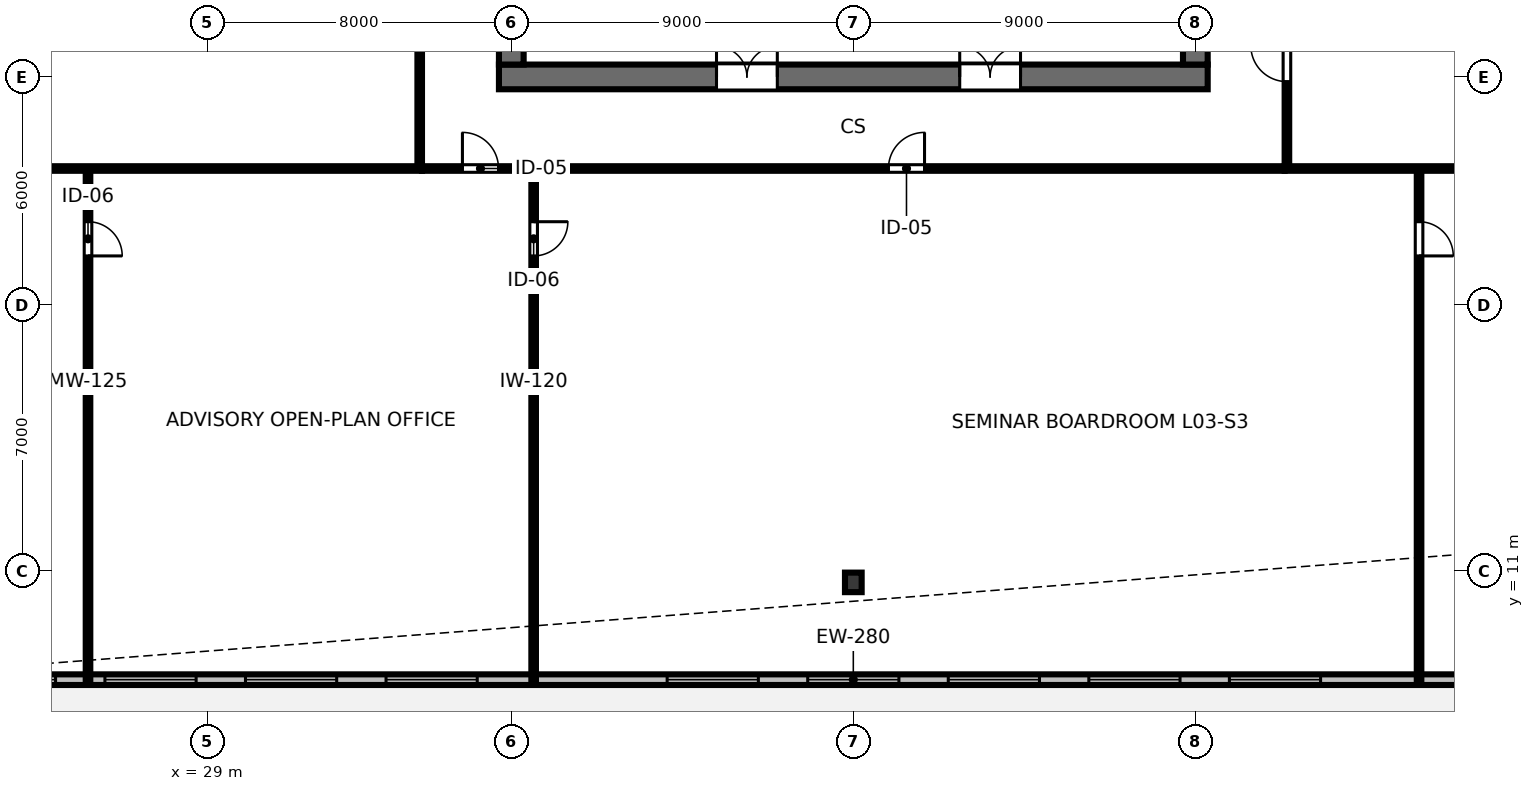
"""IFC4 building model, lengths in metres.
Left out: names, types, materials, properties, quantities, classifications, styles, units other than length and angle.
Written with IfcOpenShell. Run it as: python <this file> out.ifc"""

import sys

from ifc_helpers import new_model, si_unit, direction, frame, frame_2d, origin, origin_2d, place, context, subcontext, project, spatial, rectangle, i_section, extrude, element, fill, save


model = new_model("IFC4")
c1 = context("Model", 3, precision=1e-05, world=origin(), true_north=direction((0.0, 1.0)))
c2 = subcontext(c1, "Body", "Model", "MODEL_VIEW")
j1 = project(units=[si_unit("LENGTHUNIT", "METRE"), si_unit("PLANEANGLEUNIT", "RADIAN")], contexts=[c1])
p1 = place(None, origin())
s1 = spatial("IfcSite", under=j1, at=p1, CompositionType="ELEMENT")
p2 = place(p1, origin())
s2 = spatial("IfcBuilding", under=s1, at=p2, CompositionType="ELEMENT")
p3 = place(p2, frame((0.0, 0.0, 14.0)))
s3 = spatial("IfcBuildingStorey", under=s2, at=p3, CompositionType="ELEMENT", Elevation=14.0)
p4 = place(p3, frame((36.675, 24.0, 0.0), z_axis=(0.0, 0.0, 1.0), x_axis=(1.0, 0.0, 0.0)))
e1 = element("IfcWall", 1, at=p4, inside=s3, PredefinedType="SHEAR", context=c2, shape_type="SweptSolid", body=[
    extrude(rectangle(XDim=18.65, YDim=0.65, at=frame_2d((9.325, 0.0))), origin(), (0.0, 0.0, 1.0), 4.22),
])
p5 = place(p4, frame((5.725, 0.0, 0.0)))
e2 = element("IfcOpeningElement", 2, at=p5, cuts=e1, PredefinedType="OPENING", context=c2, shape_type="SweptSolid", body=[
    extrude(rectangle(XDim=1.6, YDim=2.15, at=frame_2d((0.8, 1.075))), frame((0.0, 0.335, 0.0), z_axis=(0.0, -1.0, 0.0), x_axis=(1.0, 0.0, 0.0)), (0.0, 0.0, 1.0), 0.67),
])
p6 = place(p4, frame((12.125, 0.0, 0.0)))
e3 = element("IfcOpeningElement", 3, at=p6, cuts=e1, PredefinedType="OPENING", context=c2, shape_type="SweptSolid", body=[
    extrude(rectangle(XDim=1.6, YDim=2.15, at=frame_2d((0.8, 1.075))), frame((0.0, 0.335, 0.0), z_axis=(0.0, -1.0, 0.0), x_axis=(1.0, 0.0, 0.0)), (0.0, 0.0, 1.0), 0.67),
])
p7 = place(p3, frame((37.0, 24.325, 0.0), z_axis=(0.0, 0.0, 1.0), x_axis=(0.0, 1.0, 0.0)))
e4 = element("IfcWall", 4, at=p7, inside=s3, PredefinedType="SHEAR", context=c2, shape_type="SweptSolid", body=[
    extrude(rectangle(XDim=15.35, YDim=0.65, at=frame_2d((7.675, 0.0))), origin(), (0.0, 0.0, 1.0), 4.22),
])
p8 = place(p7, frame((5.2, 0.0, 0.0)))
e5 = element("IfcOpeningElement", 5, at=p8, cuts=e4, PredefinedType="OPENING", context=c2, shape_type="SweptSolid", body=[
    extrude(rectangle(XDim=1.15, YDim=2.15, at=frame_2d((0.575, 1.075))), frame((0.0, 0.335, 0.0), z_axis=(0.0, -1.0, 0.0), x_axis=(1.0, 0.0, 0.0)), (0.0, 0.0, 1.0), 0.67),
])
p9 = place(p3, frame((55.0, 24.325, 0.0), z_axis=(0.0, 0.0, 1.0), x_axis=(0.0, 1.0, 0.0)))
e6 = element("IfcWall", 6, at=p9, inside=s3, PredefinedType="SHEAR", context=c2, shape_type="SweptSolid", body=[
    extrude(rectangle(XDim=15.35, YDim=0.65, at=frame_2d((7.675, 0.0))), origin(), (0.0, 0.0, 1.0), 4.22),
])
p10 = place(p9, frame((5.2, 0.0, 0.0)))
e7 = element("IfcOpeningElement", 7, at=p10, cuts=e6, PredefinedType="OPENING", context=c2, shape_type="SweptSolid", body=[
    extrude(rectangle(XDim=1.15, YDim=2.15, at=frame_2d((0.575, 1.075))), frame((0.0, 0.335, 0.0), z_axis=(0.0, -1.0, 0.0), x_axis=(1.0, 0.0, 0.0)), (0.0, 0.0, 1.0), 0.67),
])
p11 = place(p3, frame((46.0, 10.7, 0.0), z_axis=(0.0, 0.0, 1.0), x_axis=(1.0, 0.0, 0.0)))
e8 = element("IfcColumn", 8, at=p11, inside=s3, PredefinedType="COLUMN", context=c2, shape_type="SweptSolid", body=[
    extrude(i_section(OverallWidth=0.439, OverallDepth=0.514, WebThickness=0.06, FlangeThickness=0.097, FilletRadius=0.025, at=origin_2d()), origin(), (0.0, 0.0, 1.0), 4.208),
])
p12 = place(p3, frame((17.16, 8.14, 0.0), z_axis=(0.0, 0.0, 1.0), x_axis=(1.0, 0.0, 0.0)))
e9 = element("IfcWall", 9, at=p12, inside=s3, PredefinedType="STANDARD", context=c2, shape_type="SweptSolid", body=[
    extrude(rectangle(XDim=57.68, YDim=0.28, at=frame_2d((28.84, 0.0))), origin(), (0.0, 0.0, 1.0), 4.21),
])
p13 = place(p12, frame((1.749, 0.0, 0.85)))
e10 = element("IfcOpeningElement", 10, at=p13, cuts=e9, PredefinedType="OPENING", context=c2, shape_type="SweptSolid", body=[
    extrude(rectangle(XDim=2.4, YDim=2.4, at=frame_2d((1.2, 1.2))), frame((0.0, 0.15, 0.0), z_axis=(0.0, -1.0, 0.0), x_axis=(1.0, 0.0, 0.0)), (0.0, 0.0, 1.0), 0.3),
])
p14 = place(p12, frame((5.448, 0.0, 0.85)))
e11 = element("IfcOpeningElement", 11, at=p14, cuts=e9, PredefinedType="OPENING", context=c2, shape_type="SweptSolid", body=[
    extrude(rectangle(XDim=2.4, YDim=2.4, at=frame_2d((1.2, 1.2))), frame((0.0, 0.15, 0.0), z_axis=(0.0, -1.0, 0.0), x_axis=(1.0, 0.0, 0.0)), (0.0, 0.0, 1.0), 0.3),
])
p15 = place(p12, frame((9.147, 0.0, 0.85)))
e12 = element("IfcOpeningElement", 12, at=p15, cuts=e9, PredefinedType="OPENING", context=c2, shape_type="SweptSolid", body=[
    extrude(rectangle(XDim=2.4, YDim=2.4, at=frame_2d((1.2, 1.2))), frame((0.0, 0.15, 0.0), z_axis=(0.0, -1.0, 0.0), x_axis=(1.0, 0.0, 0.0)), (0.0, 0.0, 1.0), 0.3),
])
p16 = place(p12, frame((12.845, 0.0, 0.85)))
e13 = element("IfcOpeningElement", 13, at=p16, cuts=e9, PredefinedType="OPENING", context=c2, shape_type="SweptSolid", body=[
    extrude(rectangle(XDim=2.4, YDim=2.4, at=frame_2d((1.2, 1.2))), frame((0.0, 0.15, 0.0), z_axis=(0.0, -1.0, 0.0), x_axis=(1.0, 0.0, 0.0)), (0.0, 0.0, 1.0), 0.3),
])
p17 = place(p12, frame((16.544, 0.0, 0.85)))
e14 = element("IfcOpeningElement", 14, at=p17, cuts=e9, PredefinedType="OPENING", context=c2, shape_type="SweptSolid", body=[
    extrude(rectangle(XDim=2.4, YDim=2.4, at=frame_2d((1.2, 1.2))), frame((0.0, 0.15, 0.0), z_axis=(0.0, -1.0, 0.0), x_axis=(1.0, 0.0, 0.0)), (0.0, 0.0, 1.0), 0.3),
])
p18 = place(p12, frame((23.941, 0.0, 0.85)))
e15 = element("IfcOpeningElement", 15, at=p18, cuts=e9, PredefinedType="OPENING", context=c2, shape_type="SweptSolid", body=[
    extrude(rectangle(XDim=2.4, YDim=2.4, at=frame_2d((1.2, 1.2))), frame((0.0, 0.15, 0.0), z_axis=(0.0, -1.0, 0.0), x_axis=(1.0, 0.0, 0.0)), (0.0, 0.0, 1.0), 0.3),
])
p19 = place(p12, frame((27.64, 0.0, 0.85)))
e16 = element("IfcOpeningElement", 16, at=p19, cuts=e9, PredefinedType="OPENING", context=c2, shape_type="SweptSolid", body=[
    extrude(rectangle(XDim=2.4, YDim=2.4, at=frame_2d((1.2, 1.2))), frame((0.0, 0.15, 0.0), z_axis=(0.0, -1.0, 0.0), x_axis=(1.0, 0.0, 0.0)), (0.0, 0.0, 1.0), 0.3),
])
p20 = place(p12, frame((31.339, 0.0, 0.85)))
e17 = element("IfcOpeningElement", 17, at=p20, cuts=e9, PredefinedType="OPENING", context=c2, shape_type="SweptSolid", body=[
    extrude(rectangle(XDim=2.4, YDim=2.4, at=frame_2d((1.2, 1.2))), frame((0.0, 0.15, 0.0), z_axis=(0.0, -1.0, 0.0), x_axis=(1.0, 0.0, 0.0)), (0.0, 0.0, 1.0), 0.3),
])
p21 = place(p12, frame((35.037, 0.0, 0.85)))
e18 = element("IfcOpeningElement", 18, at=p21, cuts=e9, PredefinedType="OPENING", context=c2, shape_type="SweptSolid", body=[
    extrude(rectangle(XDim=2.4, YDim=2.4, at=frame_2d((1.2, 1.2))), frame((0.0, 0.15, 0.0), z_axis=(0.0, -1.0, 0.0), x_axis=(1.0, 0.0, 0.0)), (0.0, 0.0, 1.0), 0.3),
])
p22 = place(p12, frame((38.736, 0.0, 0.85)))
e19 = element("IfcOpeningElement", 19, at=p22, cuts=e9, PredefinedType="OPENING", context=c2, shape_type="SweptSolid", body=[
    extrude(rectangle(XDim=2.4, YDim=2.4, at=frame_2d((1.2, 1.2))), frame((0.0, 0.15, 0.0), z_axis=(0.0, -1.0, 0.0), x_axis=(1.0, 0.0, 0.0)), (0.0, 0.0, 1.0), 0.3),
])
p23 = place(p12, frame((46.133, 0.0, 0.85)))
e20 = element("IfcOpeningElement", 20, at=p23, cuts=e9, PredefinedType="OPENING", context=c2, shape_type="SweptSolid", body=[
    extrude(rectangle(XDim=2.4, YDim=2.4, at=frame_2d((1.2, 1.2))), frame((0.0, 0.15, 0.0), z_axis=(0.0, -1.0, 0.0), x_axis=(1.0, 0.0, 0.0)), (0.0, 0.0, 1.0), 0.3),
])
p24 = place(p12, frame((49.832, 0.0, 0.85)))
e21 = element("IfcOpeningElement", 21, at=p24, cuts=e9, PredefinedType="OPENING", context=c2, shape_type="SweptSolid", body=[
    extrude(rectangle(XDim=2.4, YDim=2.4, at=frame_2d((1.2, 1.2))), frame((0.0, 0.15, 0.0), z_axis=(0.0, -1.0, 0.0), x_axis=(1.0, 0.0, 0.0)), (0.0, 0.0, 1.0), 0.3),
])
p25 = place(p12, frame((53.531, 0.0, 0.85)))
e22 = element("IfcOpeningElement", 22, at=p25, cuts=e9, PredefinedType="OPENING", context=c2, shape_type="SweptSolid", body=[
    extrude(rectangle(XDim=2.4, YDim=2.4, at=frame_2d((1.2, 1.2))), frame((0.0, 0.15, 0.0), z_axis=(0.0, -1.0, 0.0), x_axis=(1.0, 0.0, 0.0)), (0.0, 0.0, 1.0), 0.3),
])
p26 = place(p3, frame((25.862, 21.59, 0.0), z_axis=(0.0, 0.0, 1.0), x_axis=(0.0, -1.0, 0.0)))
e23 = element("IfcWall", 23, at=p26, inside=s3, PredefinedType="MOVABLE", context=c2, shape_type="SweptSolid", body=[
    extrude(rectangle(XDim=13.45, YDim=0.12, at=frame_2d((6.725, 0.0))), origin(), (0.0, 0.0, 1.0), 3.31),
])
p27 = place(p26, frame((1.4, 0.0, 0.0)))
e24 = element("IfcOpeningElement", 24, at=p27, cuts=e23, PredefinedType="OPENING", context=c2, shape_type="SweptSolid", body=[
    extrude(rectangle(XDim=0.9, YDim=2.15, at=frame_2d((0.45, 1.075))), frame((0.0, 0.07, 0.0), z_axis=(0.0, -1.0, 0.0), x_axis=(1.0, 0.0, 0.0)), (0.0, 0.0, 1.0), 0.14),
])
p28 = place(p3, frame((37.588, 21.59, 0.0), z_axis=(0.0, 0.0, 1.0), x_axis=(0.0, -1.0, 0.0)))
e25 = element("IfcWall", 25, at=p28, inside=s3, PredefinedType="PARTITIONING", context=c2, shape_type="SweptSolid", body=[
    extrude(rectangle(XDim=13.45, YDim=0.12, at=frame_2d((6.725, 0.0))), origin(), (0.0, 0.0, 1.0), 3.31),
])
p29 = place(p28, frame((1.4, 0.0, 0.0)))
e26 = element("IfcOpeningElement", 26, at=p29, cuts=e25, PredefinedType="OPENING", context=c2, shape_type="SweptSolid", body=[
    extrude(rectangle(XDim=0.9, YDim=2.15, at=frame_2d((0.45, 1.075))), frame((0.0, 0.07, 0.0), z_axis=(0.0, -1.0, 0.0), x_axis=(1.0, 0.0, 0.0)), (0.0, 0.0, 1.0), 0.14),
])
p30 = place(p3, frame((60.887, 21.59, 0.0), z_axis=(0.0, 0.0, 1.0), x_axis=(0.0, -1.0, 0.0)))
e27 = element("IfcWall", 27, at=p30, inside=s3, PredefinedType="PARTITIONING", context=c2, shape_type="SweptSolid", body=[
    extrude(rectangle(XDim=13.45, YDim=0.12, at=frame_2d((6.725, 0.0))), origin(), (0.0, 0.0, 1.0), 3.31),
])
p31 = place(p30, frame((1.4, 0.0, 0.0)))
e28 = element("IfcOpeningElement", 28, at=p31, cuts=e27, PredefinedType="OPENING", context=c2, shape_type="SweptSolid", body=[
    extrude(rectangle(XDim=0.9, YDim=2.15, at=frame_2d((0.45, 1.075))), frame((0.0, 0.07, 0.0), z_axis=(0.0, -1.0, 0.0), x_axis=(1.0, 0.0, 0.0)), (0.0, 0.0, 1.0), 0.14),
])
p32 = place(p3, frame((34.65, 21.59, 0.0), z_axis=(0.0, 0.0, 1.0), x_axis=(1.0, 0.0, 0.0)))
e29 = element("IfcWall", 29, at=p32, inside=s3, PredefinedType="PARTITIONING", context=c2, shape_type="SweptSolid", body=[
    extrude(rectangle(XDim=22.7, YDim=0.12, at=frame_2d((11.35, 0.0))), origin(), (0.0, 0.0, 1.0), 3.31),
])
p33 = place(p32, frame((1.064, 0.0, 0.0)))
e30 = element("IfcOpeningElement", 30, at=p33, cuts=e29, PredefinedType="OPENING", context=c2, shape_type="SweptSolid", body=[
    extrude(rectangle(XDim=0.95, YDim=2.15, at=frame_2d((0.475, 1.075))), frame((0.0, 0.07, 0.0), z_axis=(0.0, -1.0, 0.0), x_axis=(1.0, 0.0, 0.0)), (0.0, 0.0, 1.0), 0.14),
])
p34 = place(p32, frame((12.274, 0.0, 0.0)))
e31 = element("IfcOpeningElement", 31, at=p34, cuts=e29, PredefinedType="OPENING", context=c2, shape_type="SweptSolid", body=[
    extrude(rectangle(XDim=0.95, YDim=2.15, at=frame_2d((0.475, 1.075))), frame((0.0, 0.07, 0.0), z_axis=(0.0, -1.0, 0.0), x_axis=(1.0, 0.0, 0.0)), (0.0, 0.0, 1.0), 0.14),
])
p35 = place(p3, frame((34.59, 21.65, 0.0), z_axis=(0.0, 0.0, 1.0), x_axis=(0.0, 1.0, 0.0)))
e32 = element("IfcWall", 32, at=p35, inside=s3, PredefinedType="PARTITIONING", context=c2, shape_type="SweptSolid", body=[
    extrude(rectangle(XDim=20.7, YDim=0.12, at=frame_2d((10.35, 0.0))), origin(), (0.0, 0.0, 1.0), 3.31),
])
p36 = place(p35, frame((9.875, 0.0, 0.0)))
e33 = element("IfcOpeningElement", 33, at=p36, cuts=e32, PredefinedType="OPENING", context=c2, shape_type="SweptSolid", body=[
    extrude(rectangle(XDim=0.95, YDim=2.15, at=frame_2d((0.475, 1.075))), frame((0.0, 0.07, 0.0), z_axis=(0.0, -1.0, 0.0), x_axis=(1.0, 0.0, 0.0)), (0.0, 0.0, 1.0), 0.14),
])
p37 = place(p3, frame((57.41, 21.65, 0.0), z_axis=(0.0, 0.0, 1.0), x_axis=(0.0, 1.0, 0.0)))
e34 = element("IfcWall", 34, at=p37, inside=s3, PredefinedType="PARTITIONING", context=c2, shape_type="SweptSolid", body=[
    extrude(rectangle(XDim=20.7, YDim=0.12, at=frame_2d((10.35, 0.0))), origin(), (0.0, 0.0, 1.0), 3.31),
])
p38 = place(p37, frame((2.226, 0.0, 0.0)))
e35 = element("IfcOpeningElement", 35, at=p38, cuts=e34, PredefinedType="OPENING", context=c2, shape_type="SweptSolid", body=[
    extrude(rectangle(XDim=0.95, YDim=2.15, at=frame_2d((0.475, 1.075))), frame((0.0, 0.07, 0.0), z_axis=(0.0, -1.0, 0.0), x_axis=(1.0, 0.0, 0.0)), (0.0, 0.0, 1.0), 0.14),
])
p39 = place(p37, frame((8.954, 0.0, 0.0)))
e36 = element("IfcOpeningElement", 36, at=p39, cuts=e34, PredefinedType="OPENING", context=c2, shape_type="SweptSolid", body=[
    extrude(rectangle(XDim=0.95, YDim=2.15, at=frame_2d((0.475, 1.075))), frame((0.0, 0.07, 0.0), z_axis=(0.0, -1.0, 0.0), x_axis=(1.0, 0.0, 0.0)), (0.0, 0.0, 1.0), 0.14),
])
p40 = place(p37, frame((16.603, 0.0, 0.0)))
e37 = element("IfcOpeningElement", 37, at=p40, cuts=e34, PredefinedType="OPENING", context=c2, shape_type="SweptSolid", body=[
    extrude(rectangle(XDim=0.95, YDim=2.15, at=frame_2d((0.475, 1.075))), frame((0.0, 0.07, 0.0), z_axis=(0.0, -1.0, 0.0), x_axis=(1.0, 0.0, 0.0)), (0.0, 0.0, 1.0), 0.14),
])
for number, where, z_axis, x_axis in (
    (38, (34.65, 21.59, 0.0), (0.0, 0.0, 1.0), (-1.0, 0.0, 0.0)),
    (39, (57.35, 21.59, 0.0), (0.0, 0.0, 1.0), (1.0, 0.0, 0.0)),
):
    element("IfcWall", number, at=place(p3, frame(where, z_axis=z_axis, x_axis=x_axis)), inside=s3, PredefinedType="PARTITIONING", context=c2, shape_type="SweptSolid", body=[
        extrude(rectangle(XDim=22.01, YDim=0.12, at=frame_2d((11.005, 0.0))), origin(), (0.0, 0.0, 1.0), 3.31),
    ])
p41 = place(p14, origin())
e40 = element("IfcWindow", 40, at=p41, inside=s3, PartitioningType="SINGLE_PANEL", PredefinedType="WINDOW", context=c2, shape_type="SweptSolid", body=[
    extrude(rectangle(XDim=2.4, YDim=2.4, at=frame_2d((1.2, 1.2))), frame((0.0, 0.03, 0.0), z_axis=(0.0, -1.0, 0.0), x_axis=(1.0, 0.0, 0.0)), (0.0, 0.0, 1.0), 0.06),
])
fill(e11, e40)
p42 = place(p15, origin())
e41 = element("IfcWindow", 41, at=p42, inside=s3, PartitioningType="SINGLE_PANEL", PredefinedType="WINDOW", context=c2, shape_type="SweptSolid", body=[
    extrude(rectangle(XDim=2.4, YDim=2.4, at=frame_2d((1.2, 1.2))), frame((0.0, 0.03, 0.0), z_axis=(0.0, -1.0, 0.0), x_axis=(1.0, 0.0, 0.0)), (0.0, 0.0, 1.0), 0.06),
])
fill(e12, e41)
p43 = place(p16, origin())
e42 = element("IfcWindow", 42, at=p43, inside=s3, PartitioningType="SINGLE_PANEL", PredefinedType="WINDOW", context=c2, shape_type="SweptSolid", body=[
    extrude(rectangle(XDim=2.4, YDim=2.4, at=frame_2d((1.2, 1.2))), frame((0.0, 0.03, 0.0), z_axis=(0.0, -1.0, 0.0), x_axis=(1.0, 0.0, 0.0)), (0.0, 0.0, 1.0), 0.06),
])
fill(e13, e42)
p44 = place(p17, origin())
e43 = element("IfcWindow", 43, at=p44, inside=s3, PartitioningType="SINGLE_PANEL", PredefinedType="WINDOW", context=c2, shape_type="SweptSolid", body=[
    extrude(rectangle(XDim=2.4, YDim=2.4, at=frame_2d((1.2, 1.2))), frame((0.0, 0.03, 0.0), z_axis=(0.0, -1.0, 0.0), x_axis=(1.0, 0.0, 0.0)), (0.0, 0.0, 1.0), 0.06),
])
fill(e14, e43)
p45 = place(p18, origin())
e44 = element("IfcWindow", 44, at=p45, inside=s3, PartitioningType="SINGLE_PANEL", PredefinedType="WINDOW", context=c2, shape_type="SweptSolid", body=[
    extrude(rectangle(XDim=2.4, YDim=2.4, at=frame_2d((1.2, 1.2))), frame((0.0, 0.03, 0.0), z_axis=(0.0, -1.0, 0.0), x_axis=(1.0, 0.0, 0.0)), (0.0, 0.0, 1.0), 0.06),
])
fill(e15, e44)
p46 = place(p19, origin())
e45 = element("IfcWindow", 45, at=p46, inside=s3, PartitioningType="SINGLE_PANEL", PredefinedType="WINDOW", context=c2, shape_type="SweptSolid", body=[
    extrude(rectangle(XDim=2.4, YDim=2.4, at=frame_2d((1.2, 1.2))), frame((0.0, 0.03, 0.0), z_axis=(0.0, -1.0, 0.0), x_axis=(1.0, 0.0, 0.0)), (0.0, 0.0, 1.0), 0.06),
])
fill(e16, e45)
p47 = place(p20, origin())
e46 = element("IfcWindow", 46, at=p47, inside=s3, PartitioningType="SINGLE_PANEL", PredefinedType="WINDOW", context=c2, shape_type="SweptSolid", body=[
    extrude(rectangle(XDim=2.4, YDim=2.4, at=frame_2d((1.2, 1.2))), frame((0.0, 0.03, 0.0), z_axis=(0.0, -1.0, 0.0), x_axis=(1.0, 0.0, 0.0)), (0.0, 0.0, 1.0), 0.06),
])
fill(e17, e46)
p48 = place(p21, origin())
e47 = element("IfcWindow", 47, at=p48, inside=s3, PartitioningType="SINGLE_PANEL", PredefinedType="WINDOW", context=c2, shape_type="SweptSolid", body=[
    extrude(rectangle(XDim=2.4, YDim=2.4, at=frame_2d((1.2, 1.2))), frame((0.0, 0.03, 0.0), z_axis=(0.0, -1.0, 0.0), x_axis=(1.0, 0.0, 0.0)), (0.0, 0.0, 1.0), 0.06),
])
fill(e18, e47)
p49 = place(p22, origin())
e48 = element("IfcWindow", 48, at=p49, inside=s3, PartitioningType="SINGLE_PANEL", PredefinedType="WINDOW", context=c2, shape_type="SweptSolid", body=[
    extrude(rectangle(XDim=2.4, YDim=2.4, at=frame_2d((1.2, 1.2))), frame((0.0, 0.03, 0.0), z_axis=(0.0, -1.0, 0.0), x_axis=(1.0, 0.0, 0.0)), (0.0, 0.0, 1.0), 0.06),
])
fill(e19, e48)
p50 = place(p5, origin())
e49 = element("IfcDoor", 49, at=p50, inside=s3, OperationType="DOUBLE_DOOR_SINGLE_SWING", PredefinedType="DOOR", context=c2, shape_type="SweptSolid", body=[
    extrude(rectangle(XDim=1.6, YDim=2.15, at=frame_2d((0.8, 1.075))), frame((0.0, 0.025, 0.0), z_axis=(0.0, -1.0, 0.0), x_axis=(1.0, 0.0, 0.0)), (0.0, 0.0, 1.0), 0.05),
])
fill(e2, e49)
p51 = place(p6, origin())
e50 = element("IfcDoor", 50, at=p51, inside=s3, OperationType="DOUBLE_DOOR_SINGLE_SWING", PredefinedType="DOOR", context=c2, shape_type="SweptSolid", body=[
    extrude(rectangle(XDim=1.6, YDim=2.15, at=frame_2d((0.8, 1.075))), frame((0.0, 0.025, 0.0), z_axis=(0.0, -1.0, 0.0), x_axis=(1.0, 0.0, 0.0)), (0.0, 0.0, 1.0), 0.05),
])
fill(e3, e50)
p52 = place(p27, origin())
e51 = element("IfcDoor", 51, at=p52, inside=s3, OperationType="SINGLE_SWING_RIGHT", PredefinedType="DOOR", context=c2, shape_type="SweptSolid", body=[
    extrude(rectangle(XDim=0.9, YDim=2.15, at=frame_2d((0.45, 1.075))), frame((0.0, 0.025, 0.0), z_axis=(0.0, -1.0, 0.0), x_axis=(1.0, 0.0, 0.0)), (0.0, 0.0, 1.0), 0.05),
])
fill(e24, e51)
p53 = place(p29, origin())
e52 = element("IfcDoor", 52, at=p53, inside=s3, OperationType="SINGLE_SWING_LEFT", PredefinedType="DOOR", context=c2, shape_type="SweptSolid", body=[
    extrude(rectangle(XDim=0.9, YDim=2.15, at=frame_2d((0.45, 1.075))), frame((0.0, 0.025, 0.0), z_axis=(0.0, -1.0, 0.0), x_axis=(1.0, 0.0, 0.0)), (0.0, 0.0, 1.0), 0.05),
])
fill(e26, e52)
p54 = place(p31, origin())
e53 = element("IfcDoor", 53, at=p54, inside=s3, OperationType="SINGLE_SWING_RIGHT", PredefinedType="DOOR", context=c2, shape_type="SweptSolid", body=[
    extrude(rectangle(XDim=0.9, YDim=2.15, at=frame_2d((0.45, 1.075))), frame((0.0, 0.025, 0.0), z_axis=(0.0, -1.0, 0.0), x_axis=(1.0, 0.0, 0.0)), (0.0, 0.0, 1.0), 0.05),
])
fill(e28, e53)
p55 = place(p33, origin())
e54 = element("IfcDoor", 54, at=p55, inside=s3, OperationType="SINGLE_SWING_LEFT", PredefinedType="DOOR", context=c2, shape_type="SweptSolid", body=[
    extrude(rectangle(XDim=0.95, YDim=2.15, at=frame_2d((0.475, 1.075))), frame((0.0, 0.025, 0.0), z_axis=(0.0, -1.0, 0.0), x_axis=(1.0, 0.0, 0.0)), (0.0, 0.0, 1.0), 0.05),
])
fill(e30, e54)
p56 = place(p34, origin())
e55 = element("IfcDoor", 55, at=p56, inside=s3, OperationType="SINGLE_SWING_RIGHT", PredefinedType="DOOR", context=c2, shape_type="SweptSolid", body=[
    extrude(rectangle(XDim=0.95, YDim=2.15, at=frame_2d((0.475, 1.075))), frame((0.0, 0.025, 0.0), z_axis=(0.0, -1.0, 0.0), x_axis=(1.0, 0.0, 0.0)), (0.0, 0.0, 1.0), 0.05),
])
fill(e31, e55)
p57 = place(p38, origin())
e56 = element("IfcDoor", 56, at=p57, inside=s3, OperationType="SINGLE_SWING_RIGHT", PredefinedType="DOOR", context=c2, shape_type="SweptSolid", body=[
    extrude(rectangle(XDim=0.95, YDim=2.15, at=frame_2d((0.475, 1.075))), frame((0.0, 0.025, 0.0), z_axis=(0.0, -1.0, 0.0), x_axis=(1.0, 0.0, 0.0)), (0.0, 0.0, 1.0), 0.05),
])
fill(e35, e56)
save(model, sys.argv[1])
